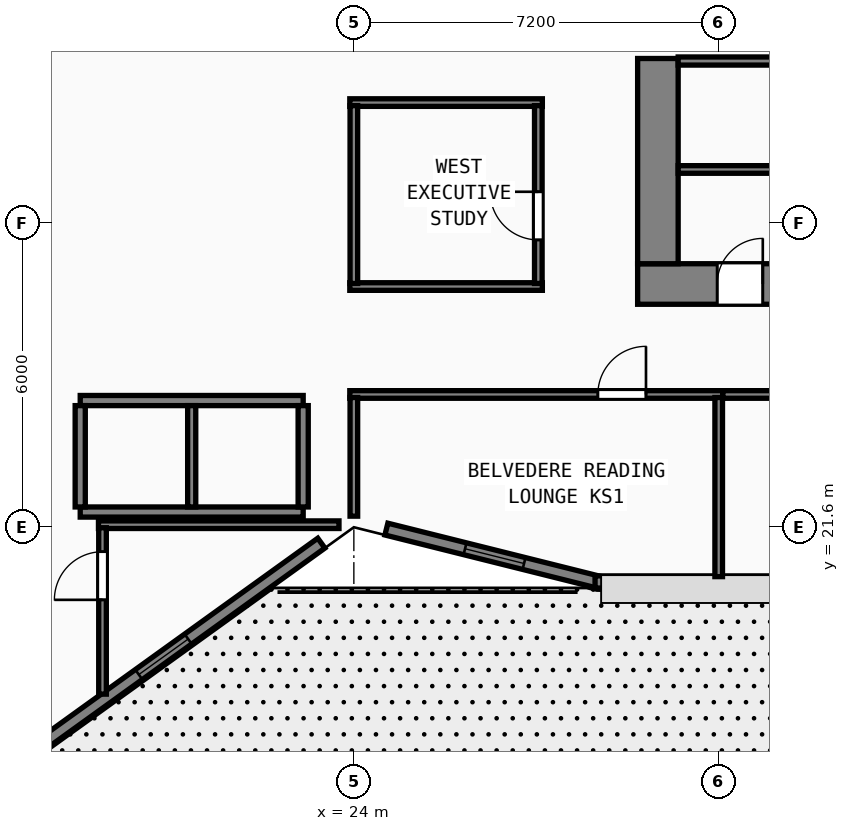
"""IFC4 building model, lengths in metres.
Left out: names, types, materials, properties, quantities, classifications, styles, units other than length and angle.
Written with IfcOpenShell. Run it as: python <this file> out.ifc"""

import sys

from ifc_helpers import new_model, si_unit, direction, frame, frame_2d, origin, origin_2d, place, context, subcontext, project, spatial, rectangle, hollow_rectangle, extrude, element, fill, save


model = new_model("IFC4")
c1 = context("Model", 3, precision=1e-05, world=origin(), true_north=direction((0.0, 1.0)))
c2 = subcontext(c1, "Body", "Model", "MODEL_VIEW")
j1 = project(units=[si_unit("LENGTHUNIT", "METRE"), si_unit("PLANEANGLEUNIT", "RADIAN")], contexts=[c1])
p1 = place(None, origin())
s1 = spatial("IfcSite", under=j1, at=p1, CompositionType="ELEMENT")
p2 = place(p1, origin())
s2 = spatial("IfcBuilding", under=s1, at=p2, CompositionType="ELEMENT")
p3 = place(p2, frame((0.0, 0.0, 24.0)))
s3 = spatial("IfcBuildingStorey", under=s2, at=p3, CompositionType="ELEMENT", Elevation=24.0)
p4 = place(p3, frame((29.6, 26.4, 0.0), z_axis=(0.0, 0.0, 1.0), x_axis=(1.0, 0.0, 0.0)))
e1 = element("IfcWall", 1, at=p4, inside=s3, PredefinedType="SHEAR", context=c2, shape_type="SweptSolid", body=[
    extrude(rectangle(XDim=17.6, YDim=0.8, at=frame_2d((8.8, 0.0))), origin(), (0.0, 0.0, 1.0), 3.6),
])
p5 = place(p4, frame((2.47, 0.0, 0.0), z_axis=(0.0, 0.0, 1.0), x_axis=(-1.0, 0.0, 0.0)))
e2 = element("IfcOpeningElement", 2, at=p5, cuts=e1, PredefinedType="OPENING", context=c2, shape_type="SweptSolid", body=[
    extrude(rectangle(XDim=0.9, YDim=2.1, at=frame_2d((0.45, 1.05))), frame((0.0, 0.41, 0.0), z_axis=(0.0, -1.0, 0.0), x_axis=(1.0, 0.0, 0.0)), (0.0, 0.0, 1.0), 0.82),
])
p6 = place(p4, frame((6.36, 0.0, 0.0), z_axis=(0.0, 0.0, 1.0), x_axis=(-1.0, 0.0, 0.0)))
e3 = element("IfcOpeningElement", 3, at=p6, cuts=e1, PredefinedType="OPENING", context=c2, shape_type="SweptSolid", body=[
    extrude(rectangle(XDim=0.9, YDim=2.1, at=frame_2d((0.45, 1.05))), frame((0.0, 0.41, 0.0), z_axis=(0.0, -1.0, 0.0), x_axis=(1.0, 0.0, 0.0)), (0.0, 0.0, 1.0), 0.82),
])
p7 = place(p3, frame((30.0, 26.8, 0.0), z_axis=(0.0, 0.0, 1.0), x_axis=(0.0, 1.0, 0.0)))
e4 = element("IfcWall", 4, at=p7, inside=s3, PredefinedType="SHEAR", context=c2, shape_type="SweptSolid", body=[
    extrude(rectangle(XDim=4.05, YDim=0.8, at=frame_2d((2.025, 0.0))), origin(), (0.0, 0.0, 1.0), 3.6),
])
for number, where, z_axis, x_axis in (
    (5, (24.0, 21.6, 0.0), (0.0, 0.0, 1.0), (1.0, 0.0, 0.0)),
    (6, (31.2, 21.6, 0.0), (0.0, 0.0, 1.0), (1.0, 0.0, 0.0)),
):
    element("IfcColumn", number, at=place(p3, frame(where, z_axis=z_axis, x_axis=x_axis)), inside=s3, PredefinedType="COLUMN", context=c2, shape_type="SweptSolid", body=[
        extrude(hollow_rectangle(XDim=1.3, YDim=1.3, WallThickness=0.048, at=origin_2d()), origin(), (0.0, 0.0, 1.0), 3.8),
    ])
for number, where, z_axis, x_axis in (
    (7, (24.0, 27.6, -0.26), (0.0, 0.0, 1.0), (1.0, 0.0, 0.0)),
    (8, (18.3, 19.2, -0.26), (0.0, 0.0, 1.0), (1.0, 0.0, 0.0)),
):
    element("IfcColumn", number, at=place(p3, frame(where, z_axis=z_axis, x_axis=x_axis)), inside=s3, PredefinedType="COLUMN", context=c2, shape_type="SweptSolid", body=[
        extrude(hollow_rectangle(XDim=1.0, YDim=1.0, WallThickness=0.038, at=origin_2d()), origin(), (0.0, 0.0, 1.0), 4.06),
    ])
p8 = place(p3, frame((14.075, 14.602, 0.0), z_axis=(0.0, 0.0, 1.0), x_axis=(0.811535555989, 0.584303038984, 0.0)))
e9 = element("IfcWall", 9, at=p8, inside=s3, PredefinedType="SOLIDWALL", context=c2, shape_type="SweptSolid", body=[
    extrude(rectangle(XDim=11.438, YDim=0.24, at=frame_2d((5.719, 0.0))), origin(), (0.0, 0.0, 1.0), 3.097),
])
p9 = place(p8, frame((1.6, 0.0, 0.85)))
e10 = element("IfcOpeningElement", 10, at=p9, cuts=e9, PredefinedType="OPENING", context=c2, shape_type="SweptSolid", body=[
    extrude(rectangle(XDim=1.2, YDim=1.85, at=frame_2d((0.6, 0.925))), frame((0.0, 0.13, 0.0), z_axis=(0.0, -1.0, 0.0), x_axis=(1.0, 0.0, 0.0)), (0.0, 0.0, 1.0), 0.26),
])
p10 = place(p8, frame((7.0, 0.0, 0.85)))
e11 = element("IfcOpeningElement", 11, at=p10, cuts=e9, PredefinedType="OPENING", context=c2, shape_type="SweptSolid", body=[
    extrude(rectangle(XDim=1.2, YDim=1.85, at=frame_2d((0.6, 0.925))), frame((0.0, 0.13, 0.0), z_axis=(0.0, -1.0, 0.0), x_axis=(1.0, 0.0, 0.0)), (0.0, 0.0, 1.0), 0.26),
])
p11 = place(p3, frame((24.642, 21.563, 0.0), z_axis=(0.0, 0.0, 1.0), x_axis=(0.970135906278, -0.242561998982, 0.0)))
e12 = element("IfcWall", 12, at=p11, inside=s3, PredefinedType="SOLIDWALL", context=c2, shape_type="SweptSolid", body=[
    extrude(rectangle(XDim=4.356, YDim=0.24, at=frame_2d((2.178, 0.0))), origin(), (0.0, 0.0, 1.0), 3.097),
])
p12 = place(p11, frame((1.6, 0.0, 0.85)))
e13 = element("IfcOpeningElement", 13, at=p12, cuts=e12, PredefinedType="OPENING", context=c2, shape_type="SweptSolid", body=[
    extrude(rectangle(XDim=1.2, YDim=1.85, at=frame_2d((0.6, 0.925))), frame((0.0, 0.13, 0.0), z_axis=(0.0, -1.0, 0.0), x_axis=(1.0, 0.0, 0.0)), (0.0, 0.0, 1.0), 0.26),
])
p13 = place(p3, frame((28.76, 20.52, 0.0), z_axis=(0.0, 0.0, 1.0), x_axis=(1.0, 0.0, 0.0)))
e14 = element("IfcWall", 14, at=p13, inside=s3, PredefinedType="SOLIDWALL", context=c2, shape_type="SweptSolid", body=[
    extrude(rectangle(XDim=19.281, YDim=0.24, at=frame_2d((9.64, 0.0))), origin(), (0.0, 0.0, 1.0), 3.6),
])
p14 = place(p13, frame((19.06, 0.0, 0.0), z_axis=(0.0, 0.0, 1.0), x_axis=(-1.0, 0.0, 0.0)))
e15 = element("IfcOpeningElement", 15, at=p14, cuts=e14, PredefinedType="OPENING", context=c2, shape_type="SweptSolid", body=[
    extrude(rectangle(XDim=1.5, YDim=2.2, at=frame_2d((0.75, 1.1))), frame((0.0, 0.13, 0.0), z_axis=(0.0, -1.0, 0.0), x_axis=(1.0, 0.0, 0.0)), (0.0, 0.0, 1.0), 0.26),
])
p15 = place(p3, frame((30.4, 30.8, 0.0), z_axis=(0.0, 0.0, 1.0), x_axis=(1.0, 0.0, 0.0)))
e16 = element("IfcWall", 16, at=p15, inside=s3, PredefinedType="SOLIDWALL", context=c2, shape_type="SweptSolid", body=[
    extrude(rectangle(XDim=16.0, YDim=0.16, at=frame_2d((8.0, 0.0))), origin(), (0.0, 0.0, 1.0), 3.6),
])
p16 = place(p3, frame((30.4, 28.66, 0.0), z_axis=(0.0, 0.0, 1.0), x_axis=(1.0, 0.0, 0.0)))
e17 = element("IfcWall", 17, at=p16, inside=s3, PredefinedType="PARTITIONING", context=c2, shape_type="SweptSolid", body=[
    extrude(rectangle(XDim=16.0, YDim=0.15, at=frame_2d((8.0, 0.0))), origin(), (0.0, 0.0, 1.0), 3.6),
])
for number, where, z_axis, x_axis in (
    (18, (18.6, 24.1, 0.0), (0.0, 0.0, 1.0), (1.0, 0.0, 0.0)),
    (19, (18.6, 21.9, 0.0), (0.0, 0.0, 1.0), (1.0, 0.0, 0.0)),
):
    element("IfcWall", number, at=place(p3, frame(where, z_axis=z_axis, x_axis=x_axis)), inside=s3, PredefinedType="SOLIDWALL", context=c2, shape_type="SweptSolid", body=[
        extrude(rectangle(XDim=4.4, YDim=0.2, at=frame_2d((2.2, 0.0))), origin(), (0.0, 0.0, 1.0), 3.6),
    ])
for number, where, z_axis, x_axis in (
    (20, (18.6, 22.0, 0.0), (0.0, 0.0, 1.0), (0.0, 1.0, 0.0)),
    (21, (23.0, 22.0, 0.0), (0.0, 0.0, 1.0), (0.0, 1.0, 0.0)),
):
    element("IfcWall", number, at=place(p3, frame(where, z_axis=z_axis, x_axis=x_axis)), inside=s3, PredefinedType="SOLIDWALL", context=c2, shape_type="SweptSolid", body=[
        extrude(rectangle(XDim=2.0, YDim=0.2, at=frame_2d((1.0, 0.0))), origin(), (0.0, 0.0, 1.0), 3.6),
    ])
p17 = place(p3, frame((20.8, 22.0, 0.0), z_axis=(0.0, 0.0, 1.0), x_axis=(0.0, 1.0, 0.0)))
e22 = element("IfcWall", 22, at=p17, inside=s3, PredefinedType="SOLIDWALL", context=c2, shape_type="SweptSolid", body=[
    extrude(rectangle(XDim=2.0, YDim=0.16, at=frame_2d((1.0, 0.0))), origin(), (0.0, 0.0, 1.0), 3.6),
])
for number, where, z_axis, x_axis in (
    (23, (23.92, 29.98, 0.0), (0.0, 0.0, 1.0), (1.0, 0.0, 0.0)),
    (24, (23.92, 26.35, 0.0), (0.0, 0.0, 1.0), (1.0, 0.0, 0.0)),
):
    element("IfcWall", number, at=place(p3, frame(where, z_axis=z_axis, x_axis=x_axis)), inside=s3, PredefinedType="PARTITIONING", context=c2, shape_type="SweptSolid", body=[
        extrude(rectangle(XDim=3.8, YDim=0.15, at=frame_2d((1.9, 0.0))), origin(), (0.0, 0.0, 1.0), 3.6),
    ])
p18 = place(p3, frame((24.0, 26.41, 0.0), z_axis=(0.0, 0.0, 1.0), x_axis=(0.0, 1.0, 0.0)))
e25 = element("IfcWall", 25, at=p18, inside=s3, PredefinedType="PARTITIONING", context=c2, shape_type="SweptSolid", body=[
    extrude(rectangle(XDim=3.51, YDim=0.15, at=frame_2d((1.755, 0.0))), origin(), (0.0, 0.0, 1.0), 3.097),
])
p19 = place(p3, frame((27.64, 26.41, 0.0), z_axis=(0.0, 0.0, 1.0), x_axis=(0.0, 1.0, 0.0)))
e26 = element("IfcWall", 26, at=p19, inside=s3, PredefinedType="PARTITIONING", context=c2, shape_type="SweptSolid", body=[
    extrude(rectangle(XDim=3.51, YDim=0.15, at=frame_2d((1.755, 0.0))), origin(), (0.0, 0.0, 1.0), 3.6),
])
p20 = place(p19, frame((1.81, 0.0, 0.0), z_axis=(0.0, 0.0, 1.0), x_axis=(-1.0, 0.0, 0.0)))
e27 = element("IfcOpeningElement", 27, at=p20, cuts=e26, PredefinedType="OPENING", context=c2, shape_type="SweptSolid", body=[
    extrude(rectangle(XDim=0.95, YDim=2.12, at=frame_2d((0.475, 1.06))), frame((0.0, 0.085, 0.0), z_axis=(0.0, -1.0, 0.0), x_axis=(1.0, 0.0, 0.0)), (0.0, 0.0, 1.0), 0.17),
])
p21 = place(p3, frame((23.92, 24.22, 0.0), z_axis=(0.0, 0.0, 1.0), x_axis=(1.0, 0.0, 0.0)))
e28 = element("IfcWall", 28, at=p21, inside=s3, PredefinedType="PARTITIONING", context=c2, shape_type="SweptSolid", body=[
    extrude(rectangle(XDim=7.36, YDim=0.15, at=frame_2d((3.68, 0.0))), origin(), (0.0, 0.0, 1.0), 3.6),
])
p22 = place(p21, frame((5.845, 0.0, 0.0), z_axis=(0.0, 0.0, 1.0), x_axis=(-1.0, 0.0, 0.0)))
e29 = element("IfcOpeningElement", 29, at=p22, cuts=e28, PredefinedType="OPENING", context=c2, shape_type="SweptSolid", body=[
    extrude(rectangle(XDim=0.95, YDim=2.12, at=frame_2d((0.475, 1.06))), frame((0.0, 0.085, 0.0), z_axis=(0.0, -1.0, 0.0), x_axis=(1.0, 0.0, 0.0)), (0.0, 0.0, 1.0), 0.17),
])
p23 = place(p3, frame((24.0, 21.819, 0.0), z_axis=(0.0, 0.0, 1.0), x_axis=(0.0, 1.0, 0.0)))
e30 = element("IfcWall", 30, at=p23, inside=s3, PredefinedType="PARTITIONING", context=c2, shape_type="SweptSolid", body=[
    extrude(rectangle(XDim=2.341, YDim=0.15, at=frame_2d((1.171, 0.0))), origin(), (0.0, 0.0, 1.0), 3.097),
])
p24 = place(p3, frame((31.2, 20.625, 0.0), z_axis=(0.0, 0.0, 1.0), x_axis=(0.0, 1.0, 0.0)))
e31 = element("IfcWall", 31, at=p24, inside=s3, PredefinedType="PARTITIONING", context=c2, shape_type="SweptSolid", body=[
    extrude(rectangle(XDim=3.535, YDim=0.15, at=frame_2d((1.768, 0.0))), origin(), (0.0, 0.0, 1.0), 2.985),
])
p25 = place(p3, frame((31.282, 24.22, 0.0), z_axis=(0.0, 0.0, 1.0), x_axis=(1.0, 0.0, 0.0)))
e32 = element("IfcWall", 32, at=p25, inside=s3, PredefinedType="PARTITIONING", context=c2, shape_type="SweptSolid", body=[
    extrude(rectangle(XDim=7.198, YDim=0.15, at=frame_2d((3.599, 0.0))), origin(), (0.0, 0.0, 1.0), 3.6),
])
p26 = place(p25, frame((3.913, 0.0, 0.0), z_axis=(0.0, 0.0, 1.0), x_axis=(-1.0, 0.0, 0.0)))
e33 = element("IfcOpeningElement", 33, at=p26, cuts=e32, PredefinedType="OPENING", context=c2, shape_type="SweptSolid", body=[
    extrude(rectangle(XDim=0.95, YDim=2.12, at=frame_2d((0.475, 1.06))), frame((0.0, 0.085, 0.0), z_axis=(0.0, -1.0, 0.0), x_axis=(1.0, 0.0, 0.0)), (0.0, 0.0, 1.0), 0.17),
])
p27 = place(p3, frame((18.96, 21.65, 0.0), z_axis=(0.0, 0.0, 1.0), x_axis=(1.0, 0.0, 0.0)))
e34 = element("IfcWall", 34, at=p27, inside=s3, PredefinedType="PARTITIONING", context=c2, shape_type="SweptSolid", body=[
    extrude(rectangle(XDim=4.747, YDim=0.15, at=frame_2d((2.373, 0.0))), origin(), (0.0, 0.0, 1.0), 3.6),
])
p28 = place(p3, frame((19.04, 18.306, 0.0), z_axis=(0.0, 0.0, 1.0), x_axis=(0.0, 1.0, 0.0)))
e35 = element("IfcWall", 35, at=p28, inside=s3, PredefinedType="PARTITIONING", context=c2, shape_type="SweptSolid", body=[
    extrude(rectangle(XDim=3.284, YDim=0.15, at=frame_2d((1.642, 0.0))), origin(), (0.0, 0.0, 1.0), 3.6),
])
p29 = place(p28, frame((1.861, 0.0, 0.0)))
e36 = element("IfcOpeningElement", 36, at=p29, cuts=e35, PredefinedType="OPENING", context=c2, shape_type="SweptSolid", body=[
    extrude(rectangle(XDim=0.95, YDim=2.12, at=frame_2d((0.475, 1.06))), frame((0.0, 0.085, 0.0), z_axis=(0.0, -1.0, 0.0), x_axis=(1.0, 0.0, 0.0)), (0.0, 0.0, 1.0), 0.17),
])
p30 = place(p10, origin())
e37 = element("IfcWindow", 37, at=p30, inside=s3, PartitioningType="SINGLE_PANEL", PredefinedType="WINDOW", context=c2, shape_type="SweptSolid", body=[
    extrude(rectangle(XDim=1.2, YDim=1.85, at=frame_2d((0.6, 0.925))), frame((0.0, 0.03, 0.0), z_axis=(0.0, -1.0, 0.0), x_axis=(1.0, 0.0, 0.0)), (0.0, 0.0, 1.0), 0.06),
])
fill(e11, e37)
p31 = place(p12, origin())
e38 = element("IfcWindow", 38, at=p31, inside=s3, PartitioningType="SINGLE_PANEL", PredefinedType="WINDOW", context=c2, shape_type="SweptSolid", body=[
    extrude(rectangle(XDim=1.2, YDim=1.85, at=frame_2d((0.6, 0.925))), frame((0.0, 0.03, 0.0), z_axis=(0.0, -1.0, 0.0), x_axis=(1.0, 0.0, 0.0)), (0.0, 0.0, 1.0), 0.06),
])
fill(e13, e38)
p32 = place(p5, origin())
e39 = element("IfcDoor", 39, at=p32, inside=s3, OperationType="SINGLE_SWING_LEFT", PredefinedType="DOOR", context=c2, shape_type="SweptSolid", body=[
    extrude(rectangle(XDim=0.9, YDim=2.1, at=frame_2d((0.45, 1.05))), frame((0.0, -0.195, 0.0), z_axis=(0.0, -1.0, 0.0), x_axis=(1.0, 0.0, 0.0)), (0.0, 0.0, 1.0), 0.05),
])
fill(e2, e39)
p33 = place(p20, origin())
e40 = element("IfcDoor", 40, at=p33, inside=s3, OperationType="SINGLE_SWING_LEFT", PredefinedType="DOOR", context=c2, shape_type="SweptSolid", body=[
    extrude(rectangle(XDim=0.95, YDim=2.12, at=frame_2d((0.475, 1.06))), frame((0.0, 0.025, 0.0), z_axis=(0.0, -1.0, 0.0), x_axis=(1.0, 0.0, 0.0)), (0.0, 0.0, 1.0), 0.05),
])
fill(e27, e40)
p34 = place(p22, origin())
e41 = element("IfcDoor", 41, at=p34, inside=s3, OperationType="SINGLE_SWING_LEFT", PredefinedType="DOOR", context=c2, shape_type="SweptSolid", body=[
    extrude(rectangle(XDim=0.95, YDim=2.12, at=frame_2d((0.475, 1.06))), frame((0.0, 0.025, 0.0), z_axis=(0.0, -1.0, 0.0), x_axis=(1.0, 0.0, 0.0)), (0.0, 0.0, 1.0), 0.05),
])
fill(e29, e41)
p35 = place(p29, origin())
e42 = element("IfcDoor", 42, at=p35, inside=s3, OperationType="SINGLE_SWING_LEFT", PredefinedType="DOOR", context=c2, shape_type="SweptSolid", body=[
    extrude(rectangle(XDim=0.95, YDim=2.12, at=frame_2d((0.475, 1.06))), frame((0.0, 0.025, 0.0), z_axis=(0.0, -1.0, 0.0), x_axis=(1.0, 0.0, 0.0)), (0.0, 0.0, 1.0), 0.05),
])
fill(e36, e42)
save(model, sys.argv[1])
